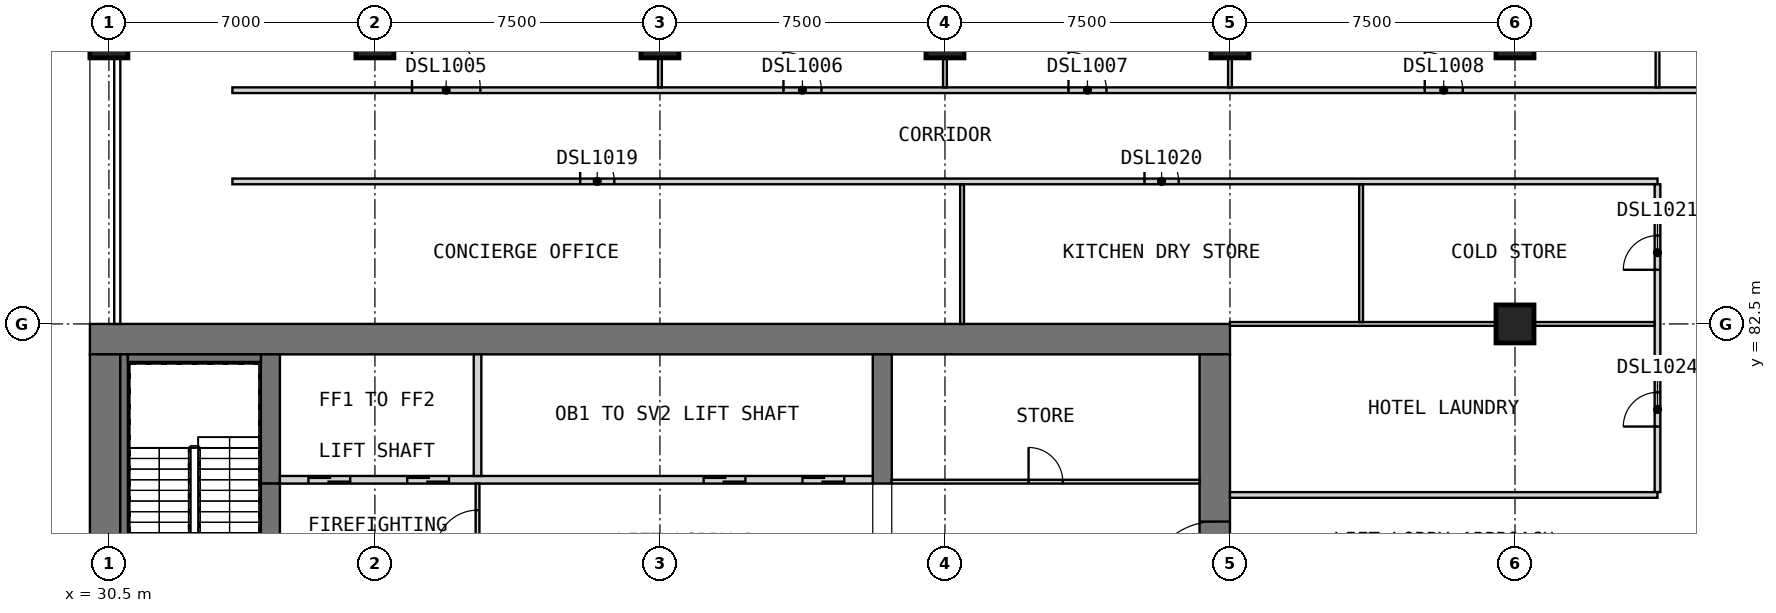
"""IFC4 building model, lengths in metres.
Left out: names, types, materials, properties, quantities, classifications, styles, units other than length and angle.
Written with IfcOpenShell. Run it as: python <this file> out.ifc"""

import sys

from ifc_helpers import new_model, si_unit, direction, frame, frame_2d, origin, origin_2d, place, context, subcontext, project, spatial, rectangle, extrude, element, fill, save


model = new_model("IFC4")
c1 = context("Model", 3, precision=1e-05, world=origin(), true_north=direction((0.0, 1.0)))
c2 = subcontext(c1, "Body", "Model", "MODEL_VIEW")
j1 = project(units=[si_unit("LENGTHUNIT", "METRE"), si_unit("PLANEANGLEUNIT", "RADIAN")], contexts=[c1])
p1 = place(None, origin())
s1 = spatial("IfcSite", under=j1, at=p1, CompositionType="ELEMENT")
p2 = place(p1, origin())
s2 = spatial("IfcBuilding", under=s1, at=p2, CompositionType="ELEMENT")
p3 = place(p2, frame((0.0, 0.0, 124.2)))
s3 = spatial("IfcBuildingStorey", under=s2, at=p3, CompositionType="ELEMENT", Elevation=124.2)
for number, where, z_axis, x_axis in (
    (1, (30.5, 90.0, 0.0), (0.0, 0.0, 1.0), (1.0, 0.0, 0.0)),
    (2, (37.5, 90.0, 0.0), (0.0, 0.0, 1.0), (1.0, 0.0, 0.0)),
    (3, (45.0, 90.0, 0.0), (0.0, 0.0, 1.0), (1.0, 0.0, 0.0)),
    (4, (52.5, 90.0, 0.0), (0.0, 0.0, 1.0), (1.0, 0.0, 0.0)),
    (5, (60.0, 90.0, 0.0), (0.0, 0.0, 1.0), (1.0, 0.0, 0.0)),
    (6, (67.5, 82.5, 0.0), (0.0, 0.0, 1.0), (1.0, 0.0, 0.0)),
    (7, (67.5, 90.0, 0.0), (0.0, 0.0, 1.0), (1.0, 0.0, 0.0)),
):
    element("IfcColumn", number, at=place(p3, frame(where, z_axis=z_axis, x_axis=x_axis)), inside=s3, PredefinedType="COLUMN", context=c2, shape_type="SweptSolid", body=[
        extrude(rectangle(XDim=1.0, YDim=1.0, at=origin_2d()), origin(), (0.0, 0.0, 1.0), 6.0),
    ])
p4 = place(p3, frame((30.0, 82.1, 0.0), z_axis=(0.0, 0.0, 1.0), x_axis=(1.0, 0.0, 0.0)))
e8 = element("IfcWall", 8, at=p4, inside=s3, PredefinedType="SHEAR", context=c2, shape_type="SweptSolid", body=[
    extrude(rectangle(XDim=30.0, YDim=0.8, at=frame_2d((15.0, 0.0))), origin(), (0.0, 0.0, 1.0), 6.0),
])
p5 = place(p3, frame((30.4, 60.8, 0.0), z_axis=(0.0, 0.0, 1.0), x_axis=(0.0, 1.0, 0.0)))
e9 = element("IfcWall", 9, at=p5, inside=s3, PredefinedType="SHEAR", context=c2, shape_type="SweptSolid", body=[
    extrude(rectangle(XDim=20.9, YDim=0.8, at=frame_2d((10.45, 0.0))), origin(), (0.0, 0.0, 1.0), 6.0),
])
p6 = place(p3, frame((59.6, 60.8, 0.0), z_axis=(0.0, 0.0, 1.0), x_axis=(0.0, 1.0, 0.0)))
e10 = element("IfcWall", 10, at=p6, inside=s3, PredefinedType="SHEAR", context=c2, shape_type="SweptSolid", body=[
    extrude(rectangle(XDim=20.9, YDim=0.8, at=frame_2d((10.45, 0.0))), origin(), (0.0, 0.0, 1.0), 6.0),
])
p7 = place(p6, frame((14.7, 0.0, 0.0)))
e11 = element("IfcOpeningElement", 11, at=p7, cuts=e10, PredefinedType="OPENING", context=c2, shape_type="SweptSolid", body=[
    extrude(rectangle(XDim=1.8, YDim=2.1, at=frame_2d((0.9, 1.05))), frame((0.0, 0.41, 0.0), z_axis=(0.0, -1.0, 0.0), x_axis=(1.0, 0.0, 0.0)), (0.0, 0.0, 1.0), 0.82),
])
for number, where, z_axis, x_axis in (
    (12, (34.75, 78.3, 0.0), (0.0, 0.0, 1.0), (0.0, 1.0, 0.0)),
    (13, (50.85, 78.3, 0.0), (0.0, 0.0, 1.0), (0.0, 1.0, 0.0)),
):
    element("IfcWall", number, at=place(p3, frame(where, z_axis=z_axis, x_axis=x_axis)), inside=s3, PredefinedType="SHEAR", context=c2, shape_type="SweptSolid", body=[
        extrude(rectangle(XDim=3.4, YDim=0.5, at=frame_2d((1.7, 0.0))), origin(), (0.0, 0.0, 1.0), 6.0),
    ])
p8 = place(p2, frame((0.0, 0.0, 34.0)))
s4 = spatial("IfcBuildingStorey", under=s2, at=p8, CompositionType="ELEMENT", Elevation=34.0)
p9 = place(p8, frame((29.7, 80.55, 0.0), z_axis=(0.0, 0.0, 1.0), x_axis=(0.0, 1.0, 0.0)))
e14 = element("IfcWall", 14, at=p9, inside=s4, PredefinedType="SOLIDWALL", context=c2, shape_type="SweptSolid", body=[
    extrude(rectangle(XDim=0.9, YDim=0.6, at=frame_2d((0.45, 0.0))), origin(), (0.0, 0.0, 1.0), 286.2),
])
p10 = place(p3, frame((35.0, 78.4, 0.0), z_axis=(0.0, 0.0, 1.0), x_axis=(1.0, 0.0, 0.0)))
e15 = element("IfcWall", 15, at=p10, inside=s3, PredefinedType="SOLIDWALL", context=c2, shape_type="SweptSolid", body=[
    extrude(rectangle(XDim=15.6, YDim=0.2, at=frame_2d((7.8, 0.0))), origin(), (0.0, 0.0, 1.0), 6.0),
])
p11 = place(p10, frame((0.75, 0.0, 0.0)))
e16 = element("IfcOpeningElement", 16, at=p11, cuts=e15, PredefinedType="OPENING", context=c2, shape_type="SweptSolid", body=[
    extrude(rectangle(XDim=1.1, YDim=2.1, at=frame_2d((0.55, 1.05))), frame((0.0, 0.11, 0.0), z_axis=(0.0, -1.0, 0.0), x_axis=(1.0, 0.0, 0.0)), (0.0, 0.0, 1.0), 0.22),
])
p12 = place(p10, frame((3.35, 0.0, 0.0)))
e17 = element("IfcOpeningElement", 17, at=p12, cuts=e15, PredefinedType="OPENING", context=c2, shape_type="SweptSolid", body=[
    extrude(rectangle(XDim=1.1, YDim=2.1, at=frame_2d((0.55, 1.05))), frame((0.0, 0.11, 0.0), z_axis=(0.0, -1.0, 0.0), x_axis=(1.0, 0.0, 0.0)), (0.0, 0.0, 1.0), 0.22),
])
p13 = place(p10, frame((11.15, 0.0, 0.0)))
e18 = element("IfcOpeningElement", 18, at=p13, cuts=e15, PredefinedType="OPENING", context=c2, shape_type="SweptSolid", body=[
    extrude(rectangle(XDim=1.1, YDim=2.1, at=frame_2d((0.55, 1.05))), frame((0.0, 0.11, 0.0), z_axis=(0.0, -1.0, 0.0), x_axis=(1.0, 0.0, 0.0)), (0.0, 0.0, 1.0), 0.22),
])
p14 = place(p10, frame((13.75, 0.0, 0.0)))
e19 = element("IfcOpeningElement", 19, at=p14, cuts=e15, PredefinedType="OPENING", context=c2, shape_type="SweptSolid", body=[
    extrude(rectangle(XDim=1.1, YDim=2.1, at=frame_2d((0.55, 1.05))), frame((0.0, 0.11, 0.0), z_axis=(0.0, -1.0, 0.0), x_axis=(1.0, 0.0, 0.0)), (0.0, 0.0, 1.0), 0.22),
])
p15 = place(p3, frame((40.2, 78.5, 0.0), z_axis=(0.0, 0.0, 1.0), x_axis=(0.0, 1.0, 0.0)))
e20 = element("IfcWall", 20, at=p15, inside=s3, PredefinedType="SOLIDWALL", context=c2, shape_type="SweptSolid", body=[
    extrude(rectangle(XDim=3.2, YDim=0.2, at=frame_2d((1.6, 0.0))), origin(), (0.0, 0.0, 1.0), 6.0),
])
p16 = place(p3, frame((40.2, 75.3, 0.0), z_axis=(0.0, 0.0, 1.0), x_axis=(0.0, 1.0, 0.0)))
e21 = element("IfcWall", 21, at=p16, inside=s3, PredefinedType="PARTITIONING", context=c2, shape_type="SweptSolid", body=[
    extrude(rectangle(XDim=3.0, YDim=0.1, at=frame_2d((1.5, 0.0))), origin(), (0.0, 0.0, 1.0), 5.75),
])
p17 = place(p16, frame((1.2, 0.0, 0.0)))
e22 = element("IfcOpeningElement", 22, at=p17, cuts=e21, PredefinedType="OPENING", context=c2, shape_type="SweptSolid", body=[
    extrude(rectangle(XDim=1.1, YDim=2.1, at=frame_2d((0.55, 1.05))), frame((0.0, 0.06, 0.0), z_axis=(0.0, -1.0, 0.0), x_axis=(1.0, 0.0, 0.0)), (0.0, 0.0, 1.0), 0.12),
])
p18 = place(p3, frame((34.75, 74.45, 0.0), z_axis=(0.0, 0.0, 1.0), x_axis=(0.0, 1.0, 0.0)))
e23 = element("IfcWall", 23, at=p18, inside=s3, PredefinedType="SOLIDWALL", context=c2, shape_type="SweptSolid", body=[
    extrude(rectangle(XDim=3.85, YDim=0.5, at=frame_2d((1.925, 0.0))), origin(), (0.0, 0.0, 1.0), 4.8),
])
p19 = place(p18, frame((1.0, 0.0, 0.0)))
e24 = element("IfcOpeningElement", 24, at=p19, cuts=e23, PredefinedType="OPENING", context=c2, shape_type="SweptSolid", body=[
    extrude(rectangle(XDim=1.2, YDim=2.1, at=frame_2d((0.6, 1.05))), frame((0.0, 0.26, 0.0), z_axis=(0.0, -1.0, 0.0), x_axis=(1.0, 0.0, 0.0)), (0.0, 0.0, 1.0), 0.52),
])
p20 = place(p3, frame((30.9, 60.8, 0.0), z_axis=(0.0, 0.0, 1.0), x_axis=(0.0, 1.0, 0.0)))
e25 = element("IfcWall", 25, at=p20, inside=s3, PredefinedType="SOLIDWALL", context=c2, shape_type="SweptSolid", body=[
    extrude(rectangle(XDim=20.9, YDim=0.2, at=frame_2d((10.45, 0.0))), origin(), (0.0, 0.0, 1.0), 5.75),
])
p21 = place(p3, frame((31.0, 81.6, 0.0), z_axis=(0.0, 0.0, 1.0), x_axis=(1.0, 0.0, 0.0)))
e26 = element("IfcWall", 26, at=p21, inside=s3, PredefinedType="SOLIDWALL", context=c2, shape_type="SweptSolid", body=[
    extrude(rectangle(XDim=3.5, YDim=0.2, at=frame_2d((1.75, 0.0))), origin(), (0.0, 0.0, 1.0), 5.75),
])
p22 = place(p3, frame((51.1, 78.35, 0.0), z_axis=(0.0, 0.0, 1.0), x_axis=(1.0, 0.0, 0.0)))
e27 = element("IfcWall", 27, at=p22, inside=s3, PredefinedType="PARTITIONING", context=c2, shape_type="SweptSolid", body=[
    extrude(rectangle(XDim=8.1, YDim=0.1, at=frame_2d((4.05, 0.0))), origin(), (0.0, 0.0, 1.0), 5.75),
])
p23 = place(p22, frame((3.6, 0.0, 0.0)))
e28 = element("IfcOpeningElement", 28, at=p23, cuts=e27, PredefinedType="OPENING", context=c2, shape_type="SweptSolid", body=[
    extrude(rectangle(XDim=0.9, YDim=2.1, at=frame_2d((0.45, 1.05))), frame((0.0, 0.06, 0.0), z_axis=(0.0, -1.0, 0.0), x_axis=(1.0, 0.0, 0.0)), (0.0, 0.0, 1.0), 0.12),
])
p24 = place(p3, frame((33.75, 86.25, 0.0), z_axis=(0.0, 0.0, 1.0), x_axis=(1.0, 0.0, 0.0)))
e29 = element("IfcWall", 29, at=p24, inside=s3, PredefinedType="PARTITIONING", context=c2, shape_type="SweptSolid", body=[
    extrude(rectangle(XDim=37.5, YDim=0.15, at=frame_2d((18.75, 0.0))), origin(), (0.0, 0.0, 1.0), 5.75),
])
p25 = place(p24, frame((9.15, 0.0, 0.0)))
e30 = element("IfcOpeningElement", 30, at=p25, cuts=e29, PredefinedType="OPENING", context=c2, shape_type="SweptSolid", body=[
    extrude(rectangle(XDim=0.9, YDim=2.1, at=frame_2d((0.45, 1.05))), frame((0.0, 0.085, 0.0), z_axis=(0.0, -1.0, 0.0), x_axis=(1.0, 0.0, 0.0)), (0.0, 0.0, 1.0), 0.17),
])
p26 = place(p24, frame((24.0, 0.0, 0.0)))
e31 = element("IfcOpeningElement", 31, at=p26, cuts=e29, PredefinedType="OPENING", context=c2, shape_type="SweptSolid", body=[
    extrude(rectangle(XDim=0.9, YDim=2.1, at=frame_2d((0.45, 1.05))), frame((0.0, 0.085, 0.0), z_axis=(0.0, -1.0, 0.0), x_axis=(1.0, 0.0, 0.0)), (0.0, 0.0, 1.0), 0.17),
])
p27 = place(p3, frame((33.75, 88.65, 0.0), z_axis=(0.0, 0.0, 1.0), x_axis=(1.0, 0.0, 0.0)))
e32 = element("IfcWall", 32, at=p27, inside=s3, PredefinedType="PARTITIONING", context=c2, shape_type="SweptSolid", body=[
    extrude(rectangle(XDim=39.9, YDim=0.15, at=frame_2d((19.95, 0.0))), origin(), (0.0, 0.0, 1.0), 5.75),
])
p28 = place(p27, frame((4.725, 0.0, 0.0)))
e33 = element("IfcOpeningElement", 33, at=p28, cuts=e32, PredefinedType="OPENING", context=c2, shape_type="SweptSolid", body=[
    extrude(rectangle(XDim=1.8, YDim=2.1, at=frame_2d((0.9, 1.05))), frame((0.0, 0.085, 0.0), z_axis=(0.0, -1.0, 0.0), x_axis=(1.0, 0.0, 0.0)), (0.0, 0.0, 1.0), 0.17),
])
p29 = place(p27, frame((14.5, 0.0, 0.0)))
e34 = element("IfcOpeningElement", 34, at=p29, cuts=e32, PredefinedType="OPENING", context=c2, shape_type="SweptSolid", body=[
    extrude(rectangle(XDim=1.0, YDim=2.1, at=frame_2d((0.5, 1.05))), frame((0.0, 0.085, 0.0), z_axis=(0.0, -1.0, 0.0), x_axis=(1.0, 0.0, 0.0)), (0.0, 0.0, 1.0), 0.17),
])
p30 = place(p27, frame((22.0, 0.0, 0.0)))
e35 = element("IfcOpeningElement", 35, at=p30, cuts=e32, PredefinedType="OPENING", context=c2, shape_type="SweptSolid", body=[
    extrude(rectangle(XDim=1.0, YDim=2.1, at=frame_2d((0.5, 1.05))), frame((0.0, 0.085, 0.0), z_axis=(0.0, -1.0, 0.0), x_axis=(1.0, 0.0, 0.0)), (0.0, 0.0, 1.0), 0.17),
])
p31 = place(p27, frame((31.375, 0.0, 0.0)))
e36 = element("IfcOpeningElement", 36, at=p31, cuts=e32, PredefinedType="OPENING", context=c2, shape_type="SweptSolid", body=[
    extrude(rectangle(XDim=1.0, YDim=2.1, at=frame_2d((0.5, 1.05))), frame((0.0, 0.085, 0.0), z_axis=(0.0, -1.0, 0.0), x_axis=(1.0, 0.0, 0.0)), (0.0, 0.0, 1.0), 0.17),
])
p32 = place(p3, frame((71.25, 78.075, 0.0), z_axis=(0.0, 0.0, 1.0), x_axis=(0.0, 1.0, 0.0)))
e37 = element("IfcWall", 37, at=p32, inside=s3, PredefinedType="PARTITIONING", context=c2, shape_type="SweptSolid", body=[
    extrude(rectangle(XDim=8.1, YDim=0.15, at=frame_2d((4.05, 0.0))), origin(), (0.0, 0.0, 1.0), 5.75),
])
p33 = place(p32, frame((5.85, 0.0, 0.0)))
e38 = element("IfcOpeningElement", 38, at=p33, cuts=e37, PredefinedType="OPENING", context=c2, shape_type="SweptSolid", body=[
    extrude(rectangle(XDim=0.9, YDim=2.1, at=frame_2d((0.45, 1.05))), frame((0.0, 0.085, 0.0), z_axis=(0.0, -1.0, 0.0), x_axis=(1.0, 0.0, 0.0)), (0.0, 0.0, 1.0), 0.17),
])
p34 = place(p32, frame((1.725, 0.0, 0.0)))
e39 = element("IfcOpeningElement", 39, at=p34, cuts=e37, PredefinedType="OPENING", context=c2, shape_type="SweptSolid", body=[
    extrude(rectangle(XDim=0.9, YDim=2.1, at=frame_2d((0.45, 1.05))), frame((0.0, 0.085, 0.0), z_axis=(0.0, -1.0, 0.0), x_axis=(1.0, 0.0, 0.0)), (0.0, 0.0, 1.0), 0.17),
])
p35 = place(p3, frame((60.0, 82.5, 0.0), z_axis=(0.0, 0.0, 1.0), x_axis=(1.0, 0.0, 0.0)))
e40 = element("IfcWall", 40, at=p35, inside=s3, PredefinedType="PARTITIONING", context=c2, shape_type="SweptSolid", body=[
    extrude(rectangle(XDim=11.175, YDim=0.1, at=frame_2d((5.587, 0.0))), origin(), (0.0, 0.0, 1.0), 5.75),
])
for number, where, z_axis, x_axis in (
    (41, (45.0, 88.725, 0.0), (0.0, 0.0, 1.0), (0.0, 1.0, 0.0)),
    (42, (52.5, 88.725, 0.0), (0.0, 0.0, 1.0), (0.0, 1.0, 0.0)),
):
    element("IfcWall", number, at=place(p3, frame(where, z_axis=z_axis, x_axis=x_axis)), inside=s3, PredefinedType="PARTITIONING", context=c2, shape_type="SweptSolid", body=[
        extrude(rectangle(XDim=12.525, YDim=0.1, at=frame_2d((6.262, 0.0))), origin(), (0.0, 0.0, 1.0), 5.75),
    ])
p36 = place(p3, frame((52.95, 82.5, 0.0), z_axis=(0.0, 0.0, 1.0), x_axis=(0.0, 1.0, 0.0)))
e43 = element("IfcWall", 43, at=p36, inside=s3, PredefinedType="PARTITIONING", context=c2, shape_type="SweptSolid", body=[
    extrude(rectangle(XDim=3.675, YDim=0.1, at=frame_2d((1.837, 0.0))), origin(), (0.0, 0.0, 1.0), 5.75),
])
p37 = place(p3, frame((60.0, 88.725, 0.0), z_axis=(0.0, 0.0, 1.0), x_axis=(0.0, 1.0, 0.0)))
e44 = element("IfcWall", 44, at=p37, inside=s3, PredefinedType="PARTITIONING", context=c2, shape_type="SweptSolid", body=[
    extrude(rectangle(XDim=12.525, YDim=0.1, at=frame_2d((6.262, 0.0))), origin(), (0.0, 0.0, 1.0), 5.75),
])
p38 = place(p3, frame((63.45, 82.55, 0.0), z_axis=(0.0, 0.0, 1.0), x_axis=(0.0, 1.0, 0.0)))
e45 = element("IfcWall", 45, at=p38, inside=s3, PredefinedType="PARTITIONING", context=c2, shape_type="SweptSolid", body=[
    extrude(rectangle(XDim=3.625, YDim=0.1, at=frame_2d((1.812, 0.0))), origin(), (0.0, 0.0, 1.0), 5.75),
])
p39 = place(p3, frame((71.25, 88.725, 0.0), z_axis=(0.0, 0.0, 1.0), x_axis=(0.0, 1.0, 0.0)))
e46 = element("IfcWall", 46, at=p39, inside=s3, PredefinedType="PARTITIONING", context=c2, shape_type="SweptSolid", body=[
    extrude(rectangle(XDim=12.525, YDim=0.1, at=frame_2d((6.262, 0.0))), origin(), (0.0, 0.0, 1.0), 5.75),
])
p40 = place(p3, frame((60.0, 78.0, 0.0), z_axis=(0.0, 0.0, 1.0), x_axis=(1.0, 0.0, 0.0)))
e47 = element("IfcWall", 47, at=p40, inside=s3, PredefinedType="PARTITIONING", context=c2, shape_type="SweptSolid", body=[
    extrude(rectangle(XDim=11.25, YDim=0.15, at=frame_2d((5.625, 0.0))), origin(), (0.0, 0.0, 1.0), 5.75),
])
p41 = place(p11, origin())
e48 = element("IfcDoor", 48, at=p41, inside=s3, OperationType="DOUBLE_DOOR_SLIDING", PredefinedType="DOOR", context=c2, shape_type="SweptSolid", body=[
    extrude(rectangle(XDim=1.1, YDim=2.1, at=frame_2d((0.55, 1.05))), frame((0.0, 0.025, 0.0), z_axis=(0.0, -1.0, 0.0), x_axis=(1.0, 0.0, 0.0)), (0.0, 0.0, 1.0), 0.05),
])
fill(e16, e48)
p42 = place(p12, origin())
e49 = element("IfcDoor", 49, at=p42, inside=s3, OperationType="DOUBLE_DOOR_SLIDING", PredefinedType="DOOR", context=c2, shape_type="SweptSolid", body=[
    extrude(rectangle(XDim=1.1, YDim=2.1, at=frame_2d((0.55, 1.05))), frame((0.0, 0.025, 0.0), z_axis=(0.0, -1.0, 0.0), x_axis=(1.0, 0.0, 0.0)), (0.0, 0.0, 1.0), 0.05),
])
fill(e17, e49)
p43 = place(p13, origin())
e50 = element("IfcDoor", 50, at=p43, inside=s3, OperationType="DOUBLE_DOOR_SLIDING", PredefinedType="DOOR", context=c2, shape_type="SweptSolid", body=[
    extrude(rectangle(XDim=1.1, YDim=2.1, at=frame_2d((0.55, 1.05))), frame((0.0, 0.025, 0.0), z_axis=(0.0, -1.0, 0.0), x_axis=(1.0, 0.0, 0.0)), (0.0, 0.0, 1.0), 0.05),
])
fill(e18, e50)
p44 = place(p14, origin())
e51 = element("IfcDoor", 51, at=p44, inside=s3, OperationType="DOUBLE_DOOR_SLIDING", PredefinedType="DOOR", context=c2, shape_type="SweptSolid", body=[
    extrude(rectangle(XDim=1.1, YDim=2.1, at=frame_2d((0.55, 1.05))), frame((0.0, 0.025, 0.0), z_axis=(0.0, -1.0, 0.0), x_axis=(1.0, 0.0, 0.0)), (0.0, 0.0, 1.0), 0.05),
])
fill(e19, e51)
p45 = place(p7, origin())
e52 = element("IfcDoor", 52, at=p45, inside=s3, OperationType="DOUBLE_DOOR_SINGLE_SWING", PredefinedType="DOOR", context=c2, shape_type="SweptSolid", body=[
    extrude(rectangle(XDim=1.8, YDim=2.1, at=frame_2d((0.9, 1.05))), frame((0.0, 0.025, 0.0), z_axis=(0.0, -1.0, 0.0), x_axis=(1.0, 0.0, 0.0)), (0.0, 0.0, 1.0), 0.05),
])
fill(e11, e52)
p46 = place(p17, origin())
e53 = element("IfcDoor", 53, at=p46, inside=s3, OperationType="SINGLE_SWING_LEFT", PredefinedType="DOOR", context=c2, shape_type="SweptSolid", body=[
    extrude(rectangle(XDim=1.1, YDim=2.1, at=frame_2d((0.55, 1.05))), frame((0.0, 0.025, 0.0), z_axis=(0.0, -1.0, 0.0), x_axis=(1.0, 0.0, 0.0)), (0.0, 0.0, 1.0), 0.05),
])
fill(e22, e53)
p47 = place(p23, origin())
e54 = element("IfcDoor", 54, at=p47, inside=s3, OperationType="SINGLE_SWING_RIGHT", PredefinedType="DOOR", context=c2, shape_type="SweptSolid", body=[
    extrude(rectangle(XDim=0.9, YDim=2.1, at=frame_2d((0.45, 1.05))), frame((0.0, 0.025, 0.0), z_axis=(0.0, -1.0, 0.0), x_axis=(1.0, 0.0, 0.0)), (0.0, 0.0, 1.0), 0.05),
])
fill(e28, e54)
p48 = place(p28, origin())
e55 = element("IfcDoor", 55, at=p48, inside=s3, OperationType="DOUBLE_DOOR_SINGLE_SWING", PredefinedType="DOOR", context=c2, shape_type="SweptSolid", body=[
    extrude(rectangle(XDim=1.8, YDim=2.1, at=frame_2d((0.9, 1.05))), frame((0.0, 0.025, 0.0), z_axis=(0.0, -1.0, 0.0), x_axis=(1.0, 0.0, 0.0)), (0.0, 0.0, 1.0), 0.05),
])
fill(e33, e55)
p49 = place(p29, origin())
e56 = element("IfcDoor", 56, at=p49, inside=s3, OperationType="SINGLE_SWING_LEFT", PredefinedType="DOOR", context=c2, shape_type="SweptSolid", body=[
    extrude(rectangle(XDim=1.0, YDim=2.1, at=frame_2d((0.5, 1.05))), frame((0.0, 0.025, 0.0), z_axis=(0.0, -1.0, 0.0), x_axis=(1.0, 0.0, 0.0)), (0.0, 0.0, 1.0), 0.05),
])
fill(e34, e56)
p50 = place(p30, origin())
e57 = element("IfcDoor", 57, at=p50, inside=s3, OperationType="SINGLE_SWING_LEFT", PredefinedType="DOOR", context=c2, shape_type="SweptSolid", body=[
    extrude(rectangle(XDim=1.0, YDim=2.1, at=frame_2d((0.5, 1.05))), frame((0.0, 0.025, 0.0), z_axis=(0.0, -1.0, 0.0), x_axis=(1.0, 0.0, 0.0)), (0.0, 0.0, 1.0), 0.05),
])
fill(e35, e57)
p51 = place(p31, origin())
e58 = element("IfcDoor", 58, at=p51, inside=s3, OperationType="SINGLE_SWING_LEFT", PredefinedType="DOOR", context=c2, shape_type="SweptSolid", body=[
    extrude(rectangle(XDim=1.0, YDim=2.1, at=frame_2d((0.5, 1.05))), frame((0.0, 0.025, 0.0), z_axis=(0.0, -1.0, 0.0), x_axis=(1.0, 0.0, 0.0)), (0.0, 0.0, 1.0), 0.05),
])
fill(e36, e58)
p52 = place(p25, origin())
e59 = element("IfcDoor", 59, at=p52, inside=s3, OperationType="SINGLE_SWING_RIGHT", PredefinedType="DOOR", context=c2, shape_type="SweptSolid", body=[
    extrude(rectangle(XDim=0.9, YDim=2.1, at=frame_2d((0.45, 1.05))), frame((0.0, 0.025, 0.0), z_axis=(0.0, -1.0, 0.0), x_axis=(1.0, 0.0, 0.0)), (0.0, 0.0, 1.0), 0.05),
])
fill(e30, e59)
p53 = place(p26, origin())
e60 = element("IfcDoor", 60, at=p53, inside=s3, OperationType="SINGLE_SWING_LEFT", PredefinedType="DOOR", context=c2, shape_type="SweptSolid", body=[
    extrude(rectangle(XDim=0.9, YDim=2.1, at=frame_2d((0.45, 1.05))), frame((0.0, 0.025, 0.0), z_axis=(0.0, -1.0, 0.0), x_axis=(1.0, 0.0, 0.0)), (0.0, 0.0, 1.0), 0.05),
])
fill(e31, e60)
p54 = place(p33, origin())
e61 = element("IfcDoor", 61, at=p54, inside=s3, OperationType="SINGLE_SWING_LEFT", PredefinedType="DOOR", context=c2, shape_type="SweptSolid", body=[
    extrude(rectangle(XDim=0.9, YDim=2.1, at=frame_2d((0.45, 1.05))), frame((0.0, 0.025, 0.0), z_axis=(0.0, -1.0, 0.0), x_axis=(1.0, 0.0, 0.0)), (0.0, 0.0, 1.0), 0.05),
])
fill(e38, e61)
p55 = place(p34, origin())
e62 = element("IfcDoor", 62, at=p55, inside=s3, OperationType="SINGLE_SWING_LEFT", PredefinedType="DOOR", context=c2, shape_type="SweptSolid", body=[
    extrude(rectangle(XDim=0.9, YDim=2.1, at=frame_2d((0.45, 1.05))), frame((0.0, 0.025, 0.0), z_axis=(0.0, -1.0, 0.0), x_axis=(1.0, 0.0, 0.0)), (0.0, 0.0, 1.0), 0.05),
])
fill(e39, e62)
save(model, sys.argv[1])
